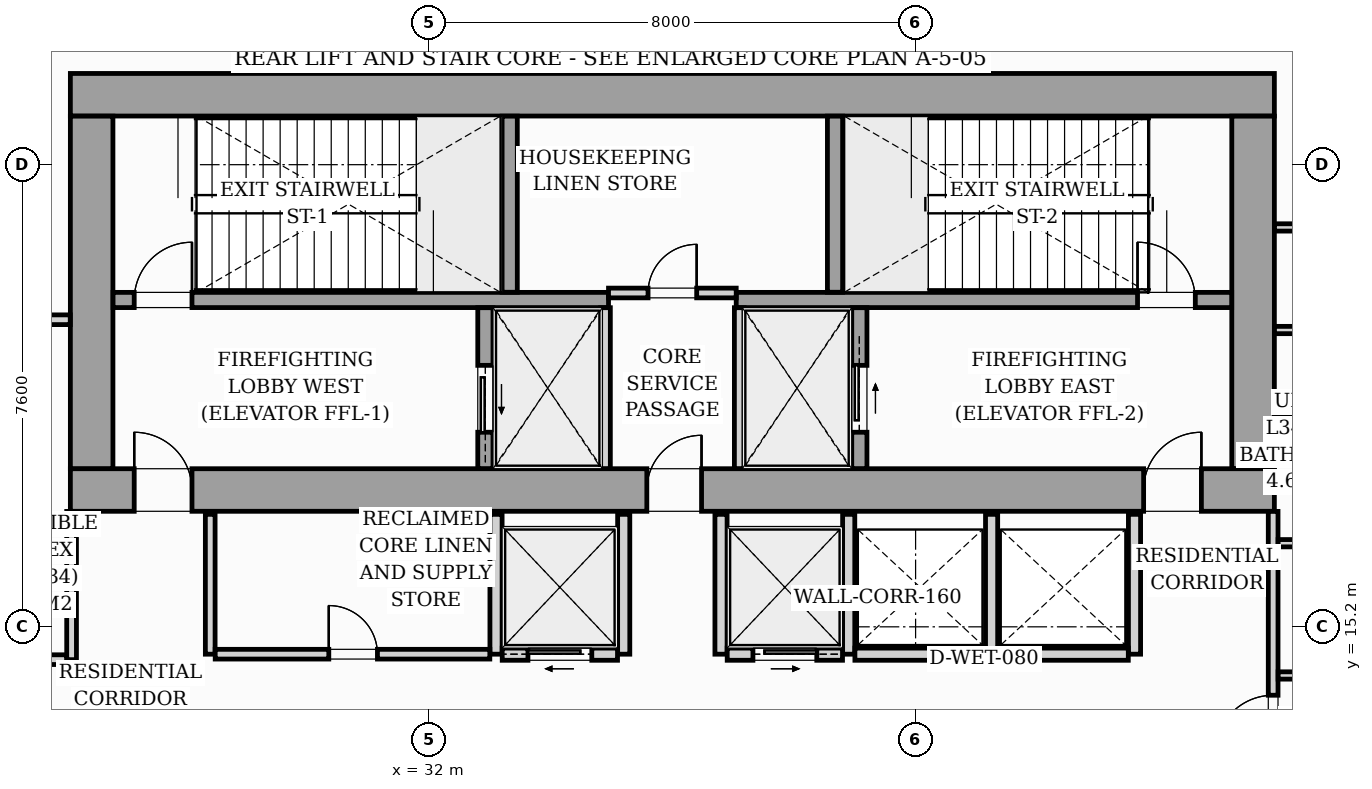
"""IFC4 building model, lengths in metres.
Left out: names, types, materials, properties, quantities, classifications, styles, units other than length and angle.
Written with IfcOpenShell. Run it as: python <this file> out.ifc"""

import sys

from ifc_helpers import new_model, si_unit, direction, frame, frame_2d, origin, origin_2d, place, context, subcontext, project, spatial, rectangle, i_section, extrude, source, transform, mapped, element, fill, save


model = new_model("IFC4")
c1 = context("Model", 3, precision=1e-05, world=origin(), true_north=direction((0.0, 1.0)))
c2 = subcontext(c1, "Body", "Model", "MODEL_VIEW")
j1 = project(units=[si_unit("LENGTHUNIT", "METRE"), si_unit("PLANEANGLEUNIT", "RADIAN")], contexts=[c1])
p1 = place(None, origin())
s1 = spatial("IfcSite", under=j1, at=p1, CompositionType="ELEMENT")
p2 = place(p1, origin())
s2 = spatial("IfcBuilding", under=s1, at=p2, CompositionType="ELEMENT")
p3 = place(p2, frame((0.0, 0.0, 119.4)))
s3 = spatial("IfcBuildingStorey", under=s2, at=p3, CompositionType="ELEMENT", Elevation=119.4)
m1 = source(origin(), c2, "Body", "SweptSolid", [
    extrude(i_section(OverallWidth=0.421, OverallDepth=0.465, WebThickness=0.045, FlangeThickness=0.073, FilletRadius=0.018, at=origin_2d()), origin(), (0.0, 0.0, 1.0), 5.196),
])
for number, where, z_axis, x_axis in (
    (1, (26.4, 17.4, 0.002), (0.0, 0.0, 1.0), (1.0, 0.0, 0.0)),
    (2, (33.12, 17.4, 0.002), (0.0, 0.0, 1.0), (1.0, 0.0, 0.0)),
    (3, (38.88, 17.4, 0.002), (0.0, 0.0, 1.0), (1.0, 0.0, 0.0)),
    (4, (45.6, 17.4, 0.002), (0.0, 0.0, 1.0), (1.0, 0.0, 0.0)),
    (5, (26.4, 24.0, 0.002), (0.0, 0.0, 1.0), (1.0, 0.0, 0.0)),
    (6, (33.12, 24.0, 0.002), (0.0, 0.0, 1.0), (1.0, 0.0, 0.0)),
    (7, (38.88, 24.0, 0.002), (0.0, 0.0, 1.0), (1.0, 0.0, 0.0)),
    (8, (45.6, 24.0, 0.002), (0.0, 0.0, 1.0), (1.0, 0.0, 0.0)),
):
    element("IfcColumn", number, at=place(p3, frame(where, z_axis=z_axis, x_axis=x_axis)), inside=s3, PredefinedType="PILASTER", context=c2, shape_type="MappedRepresentation", body=[
        mapped(m1, transform((0.0, 0.0, 0.0), scale=1.0)),
    ])
p4 = place(p3, frame((26.1, 17.45, 0.0), z_axis=(0.0, 0.0, 1.0), x_axis=(1.0, 0.0, 0.0)))
e9 = element("IfcWall", 9, at=p4, inside=s3, PredefinedType="SHEAR", context=c2, shape_type="SweptSolid", body=[
    extrude(rectangle(XDim=19.8, YDim=0.7, at=frame_2d((9.9, 0.0))), origin(), (0.0, 0.0, 1.0), 5.2),
])
p5 = place(p4, frame((1.05, 0.0, 0.0)))
e10 = element("IfcOpeningElement", 10, at=p5, cuts=e9, PredefinedType="OPENING", context=c2, shape_type="SweptSolid", body=[
    extrude(rectangle(XDim=0.95, YDim=2.06, at=frame_2d((0.475, 1.03))), frame((0.0, 0.36, 0.0), z_axis=(0.0, -1.0, 0.0), x_axis=(1.0, 0.0, 0.0)), (0.0, 0.0, 1.0), 0.72),
])
p6 = place(p4, frame((9.48, 0.0, 0.0)))
e11 = element("IfcOpeningElement", 11, at=p6, cuts=e9, PredefinedType="OPENING", context=c2, shape_type="SweptSolid", body=[
    extrude(rectangle(XDim=0.9, YDim=2.06, at=frame_2d((0.45, 1.03))), frame((0.0, 0.36, 0.0), z_axis=(0.0, -1.0, 0.0), x_axis=(1.0, 0.0, 0.0)), (0.0, 0.0, 1.0), 0.72),
])
p7 = place(p4, frame((17.65, 0.0, 0.0)))
e12 = element("IfcOpeningElement", 12, at=p7, cuts=e9, PredefinedType="OPENING", context=c2, shape_type="SweptSolid", body=[
    extrude(rectangle(XDim=0.95, YDim=2.06, at=frame_2d((0.475, 1.03))), frame((0.0, 0.36, 0.0), z_axis=(0.0, -1.0, 0.0), x_axis=(1.0, 0.0, 0.0)), (0.0, 0.0, 1.0), 0.72),
])
p8 = place(p3, frame((26.1, 23.95, 0.0), z_axis=(0.0, 0.0, 1.0), x_axis=(1.0, 0.0, 0.0)))
e13 = element("IfcWall", 13, at=p8, inside=s3, PredefinedType="SHEAR", context=c2, shape_type="SweptSolid", body=[
    extrude(rectangle(XDim=19.8, YDim=0.7, at=frame_2d((9.9, 0.0))), origin(), (0.0, 0.0, 1.0), 5.2),
])
for number, where, z_axis, x_axis in (
    (14, (26.45, 17.802, 0.0), (0.0, 0.0, 1.0), (0.0, 1.0, 0.0)),
    (15, (45.55, 17.802, 0.0), (0.0, 0.0, 1.0), (0.0, 1.0, 0.0)),
):
    element("IfcWall", number, at=place(p3, frame(where, z_axis=z_axis, x_axis=x_axis)), inside=s3, PredefinedType="SHEAR", context=c2, shape_type="SweptSolid", body=[
        extrude(rectangle(XDim=5.796, YDim=0.7, at=frame_2d((2.898, 0.0))), origin(), (0.0, 0.0, 1.0), 5.2),
    ])
p9 = place(p3, frame((26.802, 20.575, 0.0), z_axis=(0.0, 0.0, 1.0), x_axis=(1.0, 0.0, 0.0)))
e16 = element("IfcWall", 16, at=p9, inside=s3, PredefinedType="SOLIDWALL", context=c2, shape_type="SweptSolid", body=[
    extrude(rectangle(XDim=8.148, YDim=0.25, at=frame_2d((4.074, 0.0))), origin(), (0.0, 0.0, 1.0), 5.2),
])
p10 = place(p9, frame((0.348, 0.0, 0.0)))
e17 = element("IfcOpeningElement", 17, at=p10, cuts=e16, PredefinedType="OPENING", context=c2, shape_type="SweptSolid", body=[
    extrude(rectangle(XDim=0.95, YDim=2.06, at=frame_2d((0.475, 1.03))), frame((0.0, 0.135, 0.0), z_axis=(0.0, -1.0, 0.0), x_axis=(1.0, 0.0, 0.0)), (0.0, 0.0, 1.0), 0.27),
])
p11 = place(p3, frame((37.05, 20.575, 0.0), z_axis=(0.0, 0.0, 1.0), x_axis=(1.0, 0.0, 0.0)))
e18 = element("IfcWall", 18, at=p11, inside=s3, PredefinedType="SOLIDWALL", context=c2, shape_type="SweptSolid", body=[
    extrude(rectangle(XDim=8.148, YDim=0.25, at=frame_2d((4.074, 0.0))), origin(), (0.0, 0.0, 1.0), 5.2),
])
p12 = place(p11, frame((6.6, 0.0, 0.0)))
e19 = element("IfcOpeningElement", 19, at=p12, cuts=e18, PredefinedType="OPENING", context=c2, shape_type="SweptSolid", body=[
    extrude(rectangle(XDim=0.95, YDim=2.06, at=frame_2d((0.475, 1.03))), frame((0.0, 0.135, 0.0), z_axis=(0.0, -1.0, 0.0), x_axis=(1.0, 0.0, 0.0)), (0.0, 0.0, 1.0), 0.27),
])
for number, where, z_axis, x_axis in (
    (20, (33.325, 20.702, 0.0), (0.0, 0.0, 1.0), (0.0, 1.0, 0.0)),
    (21, (38.675, 20.702, 0.0), (0.0, 0.0, 1.0), (0.0, 1.0, 0.0)),
):
    element("IfcWall", number, at=place(p3, frame(where, z_axis=z_axis, x_axis=x_axis)), inside=s3, PredefinedType="SOLIDWALL", context=c2, shape_type="SweptSolid", body=[
        extrude(rectangle(XDim=2.896, YDim=0.25, at=frame_2d((1.448, 0.0))), origin(), (0.0, 0.0, 1.0), 5.2),
    ])
p13 = place(p3, frame((32.925, 17.802, 0.0), z_axis=(0.0, 0.0, 1.0), x_axis=(0.0, 1.0, 0.0)))
e22 = element("IfcWall", 22, at=p13, inside=s3, PredefinedType="SOLIDWALL", context=c2, shape_type="SweptSolid", body=[
    extrude(rectangle(XDim=2.646, YDim=0.25, at=frame_2d((1.323, 0.0))), origin(), (0.0, 0.0, 1.0), 5.2),
])
p14 = place(p13, frame((0.598, 0.0, 0.0)))
e23 = element("IfcOpeningElement", 23, at=p14, cuts=e22, PredefinedType="OPENING", context=c2, shape_type="SweptSolid", body=[
    extrude(rectangle(XDim=1.1, YDim=2.08, at=frame_2d((0.55, 1.04))), frame((0.0, 0.135, 0.0), z_axis=(0.0, -1.0, 0.0), x_axis=(1.0, 0.0, 0.0)), (0.0, 0.0, 1.0), 0.27),
])
for number, where, z_axis, x_axis in (
    (24, (34.9, 17.802, 0.0), (0.0, 0.0, 1.0), (0.0, 1.0, 0.0)),
    (25, (37.1, 17.802, 0.0), (0.0, 0.0, 1.0), (0.0, 1.0, 0.0)),
):
    element("IfcWall", number, at=place(p3, frame(where, z_axis=z_axis, x_axis=x_axis)), inside=s3, PredefinedType="PARTITIONING", context=c2, shape_type="SweptSolid", body=[
        extrude(rectangle(XDim=2.646, YDim=0.16, at=frame_2d((1.323, 0.0))), origin(), (0.0, 0.0, 1.0), 4.78),
    ])
p15 = place(p3, frame((39.075, 17.802, 0.0), z_axis=(0.0, 0.0, 1.0), x_axis=(0.0, 1.0, 0.0)))
e26 = element("IfcWall", 26, at=p15, inside=s3, PredefinedType="SOLIDWALL", context=c2, shape_type="SweptSolid", body=[
    extrude(rectangle(XDim=2.646, YDim=0.25, at=frame_2d((1.323, 0.0))), origin(), (0.0, 0.0, 1.0), 5.2),
])
p16 = place(p15, frame((0.598, 0.0, 0.0)))
e27 = element("IfcOpeningElement", 27, at=p16, cuts=e26, PredefinedType="OPENING", context=c2, shape_type="SweptSolid", body=[
    extrude(rectangle(XDim=1.1, YDim=2.08, at=frame_2d((0.55, 1.04))), frame((0.0, 0.135, 0.0), z_axis=(0.0, -1.0, 0.0), x_axis=(1.0, 0.0, 0.0)), (0.0, 0.0, 1.0), 0.27),
])
p17 = place(p3, frame((34.95, 20.69, 0.0), z_axis=(0.0, 0.0, 1.0), x_axis=(1.0, 0.0, 0.0)))
e28 = element("IfcWall", 28, at=p17, inside=s3, PredefinedType="PARTITIONING", context=c2, shape_type="SweptSolid", body=[
    extrude(rectangle(XDim=2.1, YDim=0.16, at=frame_2d((1.05, 0.0))), origin(), (0.0, 0.0, 1.0), 4.78),
])
p18 = place(p17, frame((0.65, 0.0, 0.0)))
e29 = element("IfcOpeningElement", 29, at=p18, cuts=e28, PredefinedType="OPENING", context=c2, shape_type="SweptSolid", body=[
    extrude(rectangle(XDim=0.8, YDim=2.05, at=frame_2d((0.4, 1.025))), frame((0.0, 0.09, 0.0), z_axis=(0.0, -1.0, 0.0), x_axis=(1.0, 0.0, 0.0)), (0.0, 0.0, 1.0), 0.18),
])
p19 = place(p3, frame((28.4, 14.75, 0.0), z_axis=(0.0, 0.0, 1.0), x_axis=(0.0, 1.0, 0.0)))
e30 = element("IfcWall", 30, at=p19, inside=s3, PredefinedType="PARTITIONING", context=c2, shape_type="SweptSolid", body=[
    extrude(rectangle(XDim=2.3, YDim=0.16, at=frame_2d((1.15, 0.0))), origin(), (0.0, 0.0, 1.0), 4.78),
])
p20 = place(p3, frame((33.1, 14.75, 0.0), z_axis=(0.0, 0.0, 1.0), x_axis=(0.0, 1.0, 0.0)))
e31 = element("IfcWall", 31, at=p20, inside=s3, PredefinedType="PARTITIONING", context=c2, shape_type="SweptSolid", body=[
    extrude(rectangle(XDim=2.3, YDim=0.2, at=frame_2d((1.15, 0.0))), origin(), (0.0, 0.0, 1.0), 4.78),
])
p21 = place(p3, frame((28.482, 14.75, 0.0), z_axis=(0.0, 0.0, 1.0), x_axis=(1.0, 0.0, 0.0)))
e32 = element("IfcWall", 32, at=p21, inside=s3, PredefinedType="PARTITIONING", context=c2, shape_type="SweptSolid", body=[
    extrude(rectangle(XDim=4.516, YDim=0.16, at=frame_2d((2.258, 0.0))), origin(), (0.0, 0.0, 1.0), 4.78),
])
p22 = place(p21, frame((1.868, 0.0, 0.0)))
e33 = element("IfcOpeningElement", 33, at=p22, cuts=e32, PredefinedType="OPENING", context=c2, shape_type="SweptSolid", body=[
    extrude(rectangle(XDim=0.8, YDim=2.05, at=frame_2d((0.4, 1.025))), frame((0.0, 0.09, 0.0), z_axis=(0.0, -1.0, 0.0), x_axis=(1.0, 0.0, 0.0)), (0.0, 0.0, 1.0), 0.18),
])
p23 = place(p3, frame((35.2, 14.75, 0.0), z_axis=(0.0, 0.0, 1.0), x_axis=(0.0, 1.0, 0.0)))
e34 = element("IfcWall", 34, at=p23, inside=s3, PredefinedType="PARTITIONING", context=c2, shape_type="SweptSolid", body=[
    extrude(rectangle(XDim=2.3, YDim=0.2, at=frame_2d((1.15, 0.0))), origin(), (0.0, 0.0, 1.0), 4.78),
])
p24 = place(p3, frame((33.202, 14.75, 0.0), z_axis=(0.0, 0.0, 1.0), x_axis=(1.0, 0.0, 0.0)))
e35 = element("IfcWall", 35, at=p24, inside=s3, PredefinedType="PARTITIONING", context=c2, shape_type="SweptSolid", body=[
    extrude(rectangle(XDim=1.896, YDim=0.2, at=frame_2d((0.948, 0.0))), origin(), (0.0, 0.0, 1.0), 4.78),
])
p25 = place(p24, frame((0.423, 0.0, 0.0)))
e36 = element("IfcOpeningElement", 36, at=p25, cuts=e35, PredefinedType="OPENING", context=c2, shape_type="SweptSolid", body=[
    extrude(rectangle(XDim=1.05, YDim=2.08, at=frame_2d((0.525, 1.04))), frame((0.0, 0.11, 0.0), z_axis=(0.0, -1.0, 0.0), x_axis=(1.0, 0.0, 0.0)), (0.0, 0.0, 1.0), 0.22),
])
for number, where, z_axis, x_axis in (
    (37, (36.8, 14.75, 0.0), (0.0, 0.0, 1.0), (0.0, 1.0, 0.0)),
    (38, (38.9, 14.75, 0.0), (0.0, 0.0, 1.0), (0.0, 1.0, 0.0)),
):
    element("IfcWall", number, at=place(p3, frame(where, z_axis=z_axis, x_axis=x_axis)), inside=s3, PredefinedType="PARTITIONING", context=c2, shape_type="SweptSolid", body=[
        extrude(rectangle(XDim=2.3, YDim=0.2, at=frame_2d((1.15, 0.0))), origin(), (0.0, 0.0, 1.0), 4.78),
    ])
p26 = place(p3, frame((36.902, 14.75, 0.0), z_axis=(0.0, 0.0, 1.0), x_axis=(1.0, 0.0, 0.0)))
e39 = element("IfcWall", 39, at=p26, inside=s3, PredefinedType="PARTITIONING", context=c2, shape_type="SweptSolid", body=[
    extrude(rectangle(XDim=1.896, YDim=0.2, at=frame_2d((0.948, 0.0))), origin(), (0.0, 0.0, 1.0), 4.78),
])
p27 = place(p26, frame((0.423, 0.0, 0.0)))
e40 = element("IfcOpeningElement", 40, at=p27, cuts=e39, PredefinedType="OPENING", context=c2, shape_type="SweptSolid", body=[
    extrude(rectangle(XDim=1.05, YDim=2.08, at=frame_2d((0.525, 1.04))), frame((0.0, 0.11, 0.0), z_axis=(0.0, -1.0, 0.0), x_axis=(1.0, 0.0, 0.0)), (0.0, 0.0, 1.0), 0.22),
])
for number, where, z_axis, x_axis in (
    (41, (41.25, 14.75, 0.0), (0.0, 0.0, 1.0), (0.0, 1.0, 0.0)),
    (42, (43.6, 14.75, 0.0), (0.0, 0.0, 1.0), (0.0, 1.0, 0.0)),
):
    element("IfcWall", number, at=place(p3, frame(where, z_axis=z_axis, x_axis=x_axis)), inside=s3, PredefinedType="PARTITIONING", context=c2, shape_type="SweptSolid", body=[
        extrude(rectangle(XDim=2.3, YDim=0.2, at=frame_2d((1.15, 0.0))), origin(), (0.0, 0.0, 1.0), 4.78),
    ])
for number, where, z_axis, x_axis in (
    (43, (39.002, 14.75, 0.0), (0.0, 0.0, 1.0), (1.0, 0.0, 0.0)),
    (44, (41.352, 14.75, 0.0), (0.0, 0.0, 1.0), (1.0, 0.0, 0.0)),
):
    element("IfcWall", number, at=place(p3, frame(where, z_axis=z_axis, x_axis=x_axis)), inside=s3, PredefinedType="PARTITIONING", context=c2, shape_type="SweptSolid", body=[
        extrude(rectangle(XDim=2.146, YDim=0.2, at=frame_2d((1.073, 0.0))), origin(), (0.0, 0.0, 1.0), 4.78),
    ])
p28 = place(p3, frame((45.88, 12.632, 0.0), z_axis=(0.0, 0.0, 1.0), x_axis=(0.0, 1.0, 0.0)))
e45 = element("IfcWall", 45, at=p28, inside=s3, PredefinedType="PARTITIONING", context=c2, shape_type="SweptSolid", body=[
    extrude(rectangle(XDim=4.466, YDim=0.16, at=frame_2d((2.233, 0.0))), origin(), (0.0, 0.0, 1.0), 4.78),
])
p29 = place(p28, frame((0.493, 0.0, 0.0)))
e46 = element("IfcOpeningElement", 46, at=p29, cuts=e45, PredefinedType="OPENING", context=c2, shape_type="SweptSolid", body=[
    extrude(rectangle(XDim=0.95, YDim=2.06, at=frame_2d((0.475, 1.03))), frame((0.0, 0.09, 0.0), z_axis=(0.0, -1.0, 0.0), x_axis=(1.0, 0.0, 0.0)), (0.0, 0.0, 1.0), 0.18),
])
for number, where, z_axis, x_axis in (
    (47, (45.962, 16.575, 0.0), (0.0, 0.0, 1.0), (1.0, 0.0, 0.0)),
    (48, (45.962, 14.4, 0.0), (0.0, 0.0, 1.0), (1.0, 0.0, 0.0)),
):
    element("IfcWall", number, at=place(p3, frame(where, z_axis=z_axis, x_axis=x_axis)), inside=s3, PredefinedType="PARTITIONING", context=c2, shape_type="SweptSolid", body=[
        extrude(rectangle(XDim=2.256, YDim=0.12, at=frame_2d((1.128, 0.0))), origin(), (0.0, 0.0, 1.0), 4.78),
    ])
p30 = place(p3, frame((45.902, 18.75, 0.0), z_axis=(0.0, 0.0, 1.0), x_axis=(1.0, 0.0, 0.0)))
e49 = element("IfcWall", 49, at=p30, inside=s3, PredefinedType="PARTITIONING", context=c2, shape_type="SweptSolid", body=[
    extrude(rectangle(XDim=2.316, YDim=0.12, at=frame_2d((1.158, 0.0))), origin(), (0.0, 0.0, 1.0), 4.78),
])
p31 = place(p3, frame((45.902, 21.768, 0.0), z_axis=(0.0, 0.0, 1.0), x_axis=(1.0, 0.0, 0.0)))
e50 = element("IfcWall", 50, at=p31, inside=s3, PredefinedType="PARTITIONING", context=c2, shape_type="SweptSolid", body=[
    extrude(rectangle(XDim=6.509, YDim=0.12, at=frame_2d((3.254, 0.0))), origin(), (0.0, 0.0, 1.0), 4.78),
])
p32 = place(p31, frame((2.889, 0.0, 0.0)))
e51 = element("IfcOpeningElement", 51, at=p32, cuts=e50, PredefinedType="OPENING", context=c2, shape_type="SweptSolid", body=[
    extrude(rectangle(XDim=0.85, YDim=2.05, at=frame_2d((0.425, 1.025))), frame((0.0, 0.07, 0.0), z_axis=(0.0, -1.0, 0.0), x_axis=(1.0, 0.0, 0.0)), (0.0, 0.0, 1.0), 0.14),
])
p33 = place(p3, frame((45.902, 20.081, 0.0), z_axis=(0.0, 0.0, 1.0), x_axis=(1.0, 0.0, 0.0)))
e52 = element("IfcWall", 52, at=p33, inside=s3, PredefinedType="PARTITIONING", context=c2, shape_type="SweptSolid", body=[
    extrude(rectangle(XDim=13.875, YDim=0.12, at=frame_2d((6.937, 0.0))), origin(), (0.0, 0.0, 1.0), 4.78),
])
p34 = place(p33, frame((6.708, 0.0, 0.0)))
e53 = element("IfcOpeningElement", 53, at=p34, cuts=e52, PredefinedType="OPENING", context=c2, shape_type="SweptSolid", body=[
    extrude(rectangle(XDim=0.85, YDim=2.05, at=frame_2d((0.425, 1.025))), frame((0.0, 0.07, 0.0), z_axis=(0.0, -1.0, 0.0), x_axis=(1.0, 0.0, 0.0)), (0.0, 0.0, 1.0), 0.14),
])
p35 = place(p3, frame((24.182, 20.25, 0.0), z_axis=(0.0, 0.0, 1.0), x_axis=(1.0, 0.0, 0.0)))
e54 = element("IfcWall", 54, at=p35, inside=s3, PredefinedType="PARTITIONING", context=c2, shape_type="SweptSolid", body=[
    extrude(rectangle(XDim=1.916, YDim=0.16, at=frame_2d((0.958, 0.0))), origin(), (0.0, 0.0, 1.0), 4.78),
])
p36 = place(p3, frame((26.12, 14.66, 0.0), z_axis=(0.0, 0.0, 1.0), x_axis=(0.0, 1.0, 0.0)))
e55 = element("IfcWall", 55, at=p36, inside=s3, PredefinedType="PARTITIONING", context=c2, shape_type="SweptSolid", body=[
    extrude(rectangle(XDim=2.438, YDim=0.16, at=frame_2d((1.219, 0.0))), origin(), (0.0, 0.0, 1.0), 4.78),
])
p37 = place(p3, frame((24.182, 14.66, 0.0), z_axis=(0.0, 0.0, 1.0), x_axis=(1.0, 0.0, 0.0)))
e56 = element("IfcWall", 56, at=p37, inside=s3, PredefinedType="PARTITIONING", context=c2, shape_type="SweptSolid", body=[
    extrude(rectangle(XDim=1.856, YDim=0.16, at=frame_2d((0.928, 0.0))), origin(), (0.0, 0.0, 1.0), 4.78),
])
m2 = source(origin(), c2, "Body", "SweptSolid", [
    extrude(rectangle(XDim=0.95, YDim=2.06, at=frame_2d((0.475, 1.03))), frame((0.0, 0.025, 0.0), z_axis=(0.0, -1.0, 0.0), x_axis=(1.0, 0.0, 0.0)), (0.0, 0.0, 1.0), 0.05),
])
p38 = place(p5, origin())
e57 = element("IfcDoor", 57, at=p38, inside=s3, OperationType="SINGLE_SWING_LEFT", PredefinedType="DOOR", context=c2, shape_type="MappedRepresentation", body=[
    mapped(m2, transform((0.0, 0.0, 0.0), scale=1.0)),
])
fill(e10, e57)
m3 = source(origin(), c2, "Body", "SweptSolid", [
    extrude(rectangle(XDim=0.9, YDim=2.06, at=frame_2d((0.45, 1.03))), frame((0.0, 0.025, 0.0), z_axis=(0.0, -1.0, 0.0), x_axis=(1.0, 0.0, 0.0)), (0.0, 0.0, 1.0), 0.05),
])
p39 = place(p6, origin())
e58 = element("IfcDoor", 58, at=p39, inside=s3, OperationType="SINGLE_SWING_RIGHT", PredefinedType="DOOR", context=c2, shape_type="MappedRepresentation", body=[
    mapped(m3, transform((0.0, 0.0, 0.0), scale=1.0)),
])
fill(e11, e58)
p40 = place(p7, origin())
e59 = element("IfcDoor", 59, at=p40, inside=s3, OperationType="SINGLE_SWING_RIGHT", PredefinedType="DOOR", context=c2, shape_type="MappedRepresentation", body=[
    mapped(m2, transform((0.0, 0.0, 0.0), scale=1.0)),
])
fill(e12, e59)
p41 = place(p10, origin())
e60 = element("IfcDoor", 60, at=p41, inside=s3, OperationType="SINGLE_SWING_RIGHT", PredefinedType="DOOR", context=c2, shape_type="MappedRepresentation", body=[
    mapped(m2, transform((0.0, 0.0, 0.0), scale=1.0)),
])
fill(e17, e60)
p42 = place(p12, origin())
e61 = element("IfcDoor", 61, at=p42, inside=s3, OperationType="SINGLE_SWING_LEFT", PredefinedType="DOOR", context=c2, shape_type="MappedRepresentation", body=[
    mapped(m2, transform((0.0, 0.0, 0.0), scale=1.0)),
])
fill(e19, e61)
m4 = source(origin(), c2, "Body", "SweptSolid", [
    extrude(rectangle(XDim=1.1, YDim=2.08, at=frame_2d((0.55, 1.04))), frame((0.0, 0.025, 0.0), z_axis=(0.0, -1.0, 0.0), x_axis=(1.0, 0.0, 0.0)), (0.0, 0.0, 1.0), 0.05),
])
p43 = place(p14, origin())
e62 = element("IfcDoor", 62, at=p43, inside=s3, OperationType="SLIDING_TO_LEFT", PredefinedType="DOOR", context=c2, shape_type="MappedRepresentation", body=[
    mapped(m4, transform((0.0, 0.0, 0.0), scale=1.0)),
])
fill(e23, e62)
p44 = place(p16, origin())
e63 = element("IfcDoor", 63, at=p44, inside=s3, OperationType="SLIDING_TO_RIGHT", PredefinedType="DOOR", context=c2, shape_type="MappedRepresentation", body=[
    mapped(m4, transform((0.0, 0.0, 0.0), scale=1.0)),
])
fill(e27, e63)
m5 = source(origin(), c2, "Body", "SweptSolid", [
    extrude(rectangle(XDim=0.8, YDim=2.05, at=frame_2d((0.4, 1.025))), frame((0.0, 0.025, 0.0), z_axis=(0.0, -1.0, 0.0), x_axis=(1.0, 0.0, 0.0)), (0.0, 0.0, 1.0), 0.05),
])
p45 = place(p18, origin())
e64 = element("IfcDoor", 64, at=p45, inside=s3, OperationType="SINGLE_SWING_RIGHT", PredefinedType="DOOR", context=c2, shape_type="MappedRepresentation", body=[
    mapped(m5, transform((0.0, 0.0, 0.0), scale=1.0)),
])
fill(e29, e64)
p46 = place(p22, origin())
e65 = element("IfcDoor", 65, at=p46, inside=s3, OperationType="SINGLE_SWING_LEFT", PredefinedType="DOOR", context=c2, shape_type="MappedRepresentation", body=[
    mapped(m5, transform((0.0, 0.0, 0.0), scale=1.0)),
])
fill(e33, e65)
m6 = source(origin(), c2, "Body", "SweptSolid", [
    extrude(rectangle(XDim=1.05, YDim=2.08, at=frame_2d((0.525, 1.04))), frame((0.0, 0.025, 0.0), z_axis=(0.0, -1.0, 0.0), x_axis=(1.0, 0.0, 0.0)), (0.0, 0.0, 1.0), 0.05),
])
p47 = place(p25, origin())
e66 = element("IfcDoor", 66, at=p47, inside=s3, OperationType="SLIDING_TO_LEFT", PredefinedType="DOOR", context=c2, shape_type="MappedRepresentation", body=[
    mapped(m6, transform((0.0, 0.0, 0.0), scale=1.0)),
])
fill(e36, e66)
p48 = place(p27, origin())
e67 = element("IfcDoor", 67, at=p48, inside=s3, OperationType="SLIDING_TO_RIGHT", PredefinedType="DOOR", context=c2, shape_type="MappedRepresentation", body=[
    mapped(m6, transform((0.0, 0.0, 0.0), scale=1.0)),
])
fill(e40, e67)
m7 = source(origin(), c2, "Body", "SweptSolid", [
    extrude(rectangle(XDim=0.95, YDim=2.06, at=frame_2d((0.475, 1.03))), frame((0.0, 0.025, 0.0), z_axis=(0.0, -1.0, 0.0), x_axis=(1.0, 0.0, 0.0)), (0.0, 0.0, 1.0), 0.05),
])
p49 = place(p29, origin())
e68 = element("IfcDoor", 68, at=p49, inside=s3, OperationType="SINGLE_SWING_LEFT", PredefinedType="DOOR", context=c2, shape_type="MappedRepresentation", body=[
    mapped(m7, transform((0.0, 0.0, 0.0), scale=1.0)),
])
fill(e46, e68)
save(model, sys.argv[1])
